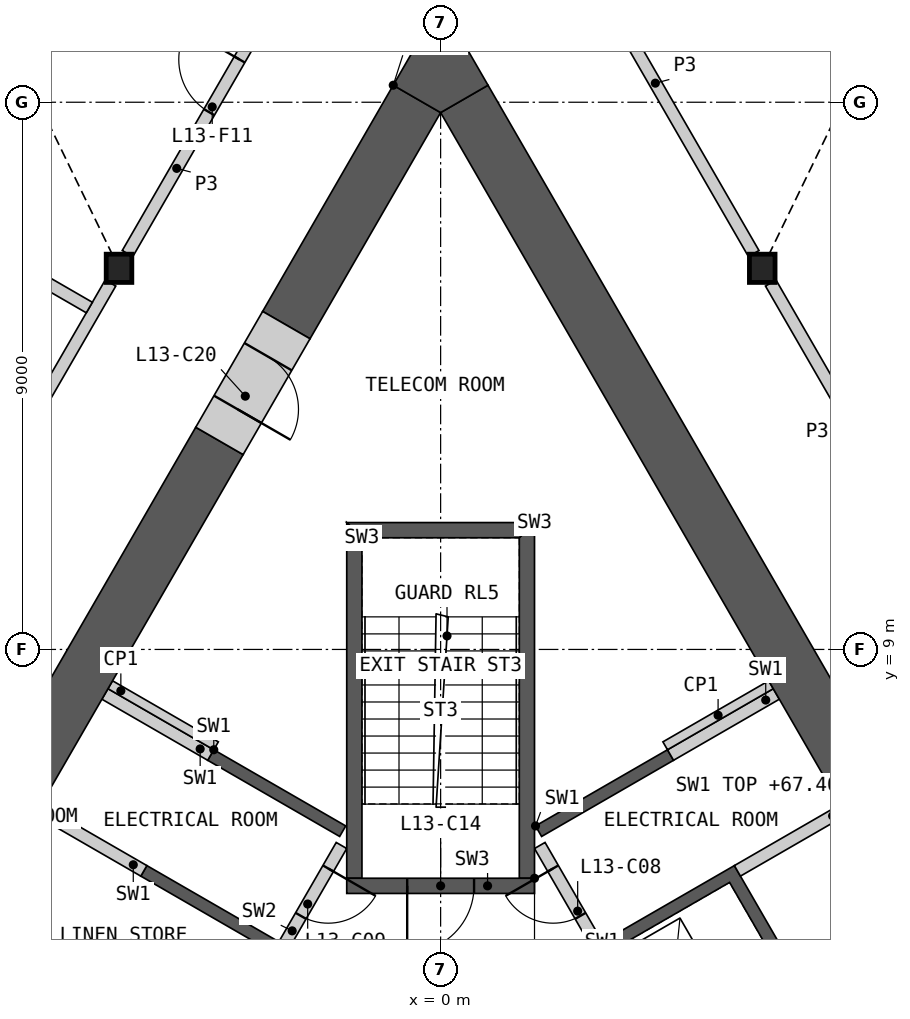
"""IFC4 building model, lengths in metres.
Left out: names, types, materials, properties, quantities, classifications, styles, units other than length and angle.
Written with IfcOpenShell. Run it as: python <this file> out.ifc"""

import sys

from ifc_helpers import new_model, si_unit, direction, frame, frame_2d, origin, origin_2d, place, context, subcontext, project, spatial, polyline, rectangle, i_section, outline, extrude, element, fill, save


model = new_model("IFC4")
c1 = context("Model", 3, precision=1e-05, world=origin(), true_north=direction((0.0, 1.0)))
c2 = subcontext(c1, "Body", "Model", "MODEL_VIEW")
j1 = project(units=[si_unit("LENGTHUNIT", "METRE"), si_unit("PLANEANGLEUNIT", "RADIAN")], contexts=[c1])
p1 = place(None, origin())
s1 = spatial("IfcSite", under=j1, at=p1, CompositionType="ELEMENT")
p2 = place(p1, origin())
s2 = spatial("IfcBuilding", under=s1, at=p2, CompositionType="ELEMENT")
p3 = place(p2, frame((0.0, 0.0, 63.6)))
s3 = spatial("IfcBuildingStorey", under=s2, at=p3, CompositionType="ELEMENT", Elevation=63.6)
for number, where, z_axis, x_axis in (
    (1, (-5.289, 15.269, 0.0), (0.0, 0.0, 1.0), (1.0, 0.0, 0.0)),
    (2, (5.289, 15.269, 0.0), (0.0, 0.0, 1.0), (1.0, 0.0, 0.0)),
):
    element("IfcColumn", number, at=place(p3, frame(where, z_axis=z_axis, x_axis=x_axis)), inside=s3, PredefinedType="COLUMN", context=c2, shape_type="SweptSolid", body=[
        extrude(i_section(OverallWidth=0.421, OverallDepth=0.465, WebThickness=0.045, FlangeThickness=0.072, at=origin_2d()), origin(), (0.0, 0.0, 1.0), 4.2),
    ])
p4 = place(p3, origin())
e3 = element("IfcWall", 3, at=p4, inside=s3, PredefinedType="SHEAR", context=c2, shape_type="SweptSolid", body=[
    extrude(outline(polyline([(1.561, 6.097), (3.731, 7.35), (3.831, 7.177), (1.66, 5.924), (1.561, 6.097)])), origin(), (0.0, 0.0, 1.0), 3.8),
])
p5 = place(p3, origin())
e4 = element("IfcWall", 4, at=p5, inside=s3, PredefinedType="SHEAR", context=c2, shape_type="SweptSolid", body=[
    extrude(outline(polyline([(2.66, 4.192), (4.831, 5.445), (8.231, -0.444), (6.061, -1.697), (5.96, -1.524), (7.952, -0.374), (6.952, 1.358), (4.96, 0.208), (4.861, 0.381), (6.852, 1.531), (5.852, 3.263), (3.861, 2.113), (3.76, 2.287), (5.752, 3.437), (4.752, 5.169), (2.76, 4.019), (2.66, 4.192)])), origin(), (0.0, 0.0, 1.0), 3.8),
])
p6 = place(p3, frame((5.817, -1.476, 0.0), z_axis=(0.0, 0.0, 1.0), x_axis=(-0.500002616675, 0.866023893041, 0.0)))
e5 = element("IfcWall", 5, at=p6, inside=s3, PredefinedType="SOLIDWALL", context=c2, shape_type="SweptSolid", body=[
    extrude(rectangle(XDim=8.373, YDim=0.2, at=frame_2d((4.187, 0.0))), origin(), (0.0, 0.0, 1.0), 3.8),
])
p7 = place(p6, frame((0.337, 0.0, 0.0)))
e6 = element("IfcOpeningElement", 6, at=p7, cuts=e5, PredefinedType="OPENING", context=c2, shape_type="SweptSolid", body=[
    extrude(rectangle(XDim=1.1, YDim=2.1, at=frame_2d((0.55, 1.05))), frame((0.0, 0.11, 0.0), z_axis=(0.0, -1.0, 0.0), x_axis=(1.0, 0.0, 0.0)), (0.0, 0.0, 1.0), 0.22),
])
p8 = place(p6, frame((2.537, 0.0, 0.0)))
e7 = element("IfcOpeningElement", 7, at=p8, cuts=e5, PredefinedType="OPENING", context=c2, shape_type="SweptSolid", body=[
    extrude(rectangle(XDim=1.1, YDim=2.1, at=frame_2d((0.55, 1.05))), frame((0.0, 0.11, 0.0), z_axis=(0.0, -1.0, 0.0), x_axis=(1.0, 0.0, 0.0)), (0.0, 0.0, 1.0), 0.22),
])
p9 = place(p6, frame((4.737, 0.0, 0.0)))
e8 = element("IfcOpeningElement", 8, at=p9, cuts=e5, PredefinedType="OPENING", context=c2, shape_type="SweptSolid", body=[
    extrude(rectangle(XDim=1.1, YDim=2.1, at=frame_2d((0.55, 1.05))), frame((0.0, 0.11, 0.0), z_axis=(0.0, -1.0, 0.0), x_axis=(1.0, 0.0, 0.0)), (0.0, 0.0, 1.0), 0.22),
])
p10 = place(p6, frame((7.037, 0.0, 0.0)))
e9 = element("IfcOpeningElement", 9, at=p10, cuts=e5, PredefinedType="OPENING", context=c2, shape_type="SweptSolid", body=[
    extrude(rectangle(XDim=0.9, YDim=2.1, at=frame_2d((0.45, 1.05))), frame((0.0, 0.11, 0.0), z_axis=(0.0, -1.0, 0.0), x_axis=(1.0, 0.0, 0.0)), (0.0, 0.0, 1.0), 0.22),
])
p11 = place(p3, frame((4.881, 5.358, 0.0), z_axis=(0.0, 0.0, 1.0), x_axis=(0.866035824272, 0.499981950752, 0.0)))
e10 = element("IfcWall", 10, at=p11, inside=s3, PredefinedType="SHEAR", context=c2, shape_type="SweptSolid", body=[
    extrude(rectangle(XDim=2.009, YDim=0.2, at=frame_2d((1.004, 0.0))), origin(), (0.0, 0.0, 1.0), 3.8),
])
p12 = place(p3, frame((3.781, 7.263, 0.0), z_axis=(0.0, 0.0, 1.0), x_axis=(0.865983199114, 0.50007309351, 0.0)))
e11 = element("IfcWall", 11, at=p12, inside=s3, PredefinedType="SHEAR", context=c2, shape_type="SweptSolid", body=[
    extrude(rectangle(XDim=2.009, YDim=0.2, at=frame_2d((1.004, 0.0))), origin(), (0.0, 0.0, 1.0), 3.8),
])
p13 = place(p3, origin())
e12 = element("IfcWall", 12, at=p13, inside=s3, PredefinedType="SHEAR", context=c2, shape_type="SweptSolid", body=[
    extrude(outline(polyline([(-2.76, 4.019), (-4.931, 5.272), (-4.831, 5.445), (-2.66, 4.192), (-2.76, 4.019)])), origin(), (0.0, 0.0, 1.0), 3.8),
])
p14 = place(p3, origin())
e13 = element("IfcWall", 13, at=p14, inside=s3, PredefinedType="SHEAR", context=c2, shape_type="SweptSolid", body=[
    extrude(outline(polyline([(-3.731, 7.35), (-1.561, 6.097), (-1.66, 5.924), (-3.831, 7.177), (-3.731, 7.35)])), origin(), (0.0, 0.0, 1.0), 3.8),
])
p15 = place(p3, frame((-1.631, 5.776, 0.0), z_axis=(0.0, 0.0, 1.0), x_axis=(-0.499992876559, -0.866029516466, 0.0)))
e14 = element("IfcWall", 14, at=p15, inside=s3, PredefinedType="SOLIDWALL", context=c2, shape_type="SweptSolid", body=[
    extrude(rectangle(XDim=6.486, YDim=0.2, at=frame_2d((3.243, 0.0))), origin(), (0.0, 0.0, 1.0), 3.8),
])
p16 = place(p15, frame((0.437, 0.0, 0.0)))
e15 = element("IfcOpeningElement", 15, at=p16, cuts=e14, PredefinedType="OPENING", context=c2, shape_type="SweptSolid", body=[
    extrude(rectangle(XDim=0.9, YDim=2.1, at=frame_2d((0.45, 1.05))), frame((0.0, 0.11, 0.0), z_axis=(0.0, -1.0, 0.0), x_axis=(1.0, 0.0, 0.0)), (0.0, 0.0, 1.0), 0.22),
])
p17 = place(p15, frame((2.637, 0.0, 0.0)))
e16 = element("IfcOpeningElement", 16, at=p17, cuts=e14, PredefinedType="OPENING", context=c2, shape_type="SweptSolid", body=[
    extrude(rectangle(XDim=0.9, YDim=2.1, at=frame_2d((0.45, 1.05))), frame((0.0, 0.11, 0.0), z_axis=(0.0, -1.0, 0.0), x_axis=(1.0, 0.0, 0.0)), (0.0, 0.0, 1.0), 0.22),
])
p18 = place(p3, frame((-3.781, 7.263, 0.0), z_axis=(0.0, 0.0, 1.0), x_axis=(-0.865983199114, 0.50007309351, 0.0)))
e17 = element("IfcWall", 17, at=p18, inside=s3, PredefinedType="SHEAR", context=c2, shape_type="SweptSolid", body=[
    extrude(rectangle(XDim=2.009, YDim=0.2, at=frame_2d((1.004, 0.0))), origin(), (0.0, 0.0, 1.0), 3.8),
])
p19 = place(p3, frame((-4.881, 5.358, 0.0), z_axis=(0.0, 0.0, 1.0), x_axis=(-0.866035824272, 0.499981950752, 0.0)))
e18 = element("IfcWall", 18, at=p19, inside=s3, PredefinedType="SHEAR", context=c2, shape_type="SweptSolid", body=[
    extrude(rectangle(XDim=2.009, YDim=0.2, at=frame_2d((1.004, 0.0))), origin(), (0.0, 0.0, 1.0), 3.8),
])
p20 = place(p3, frame((-5.981, 3.453, 0.0), z_axis=(0.0, 0.0, 1.0), x_axis=(-0.866013584312, 0.500020471368, 0.0)))
e19 = element("IfcWall", 19, at=p20, inside=s3, PredefinedType="SHEAR", context=c2, shape_type="SweptSolid", body=[
    extrude(rectangle(XDim=2.009, YDim=0.2, at=frame_2d((1.005, 0.0))), origin(), (0.0, 0.0, 1.0), 3.8),
])
p21 = place(p3, origin())
e20 = element("IfcWall", 20, at=p21, inside=s3, PredefinedType="SHEAR", context=c2, shape_type="SweptSolid", body=[
    extrude(outline(polyline([(1.544, 5.237), (1.544, 11.087), (1.294, 10.837), (1.294, 5.237), (1.544, 5.237)])), origin(), (0.0, 0.0, 1.0), 3.8),
])
p22 = place(p3, origin())
e21 = element("IfcWall", 21, at=p22, inside=s3, PredefinedType="SHEAR", context=c2, shape_type="SweptSolid", body=[
    extrude(outline(polyline([(1.544, 11.087), (-1.544, 11.087), (-1.294, 10.837), (1.294, 10.837), (1.544, 11.087)])), origin(), (0.0, 0.0, 1.0), 3.8),
])
p23 = place(p3, origin())
e22 = element("IfcWall", 22, at=p23, inside=s3, PredefinedType="SHEAR", context=c2, shape_type="SweptSolid", body=[
    extrude(outline(polyline([(-1.294, 10.837), (-1.544, 11.087), (-1.544, 5.237), (-1.294, 5.237), (-1.294, 10.837)])), origin(), (0.0, 0.0, 1.0), 3.8),
])
p24 = place(p3, frame((1.544, 5.112, 0.0), z_axis=(0.0, 0.0, 1.0), x_axis=(-1.0, 0.0, 0.0)))
e23 = element("IfcWall", 23, at=p24, inside=s3, PredefinedType="SHEAR", context=c2, shape_type="SweptSolid", body=[
    extrude(rectangle(XDim=3.088, YDim=0.25, at=frame_2d((1.544, 0.0))), origin(), (0.0, 0.0, 1.0), 3.8),
])
p25 = place(p24, frame((0.994, 0.0, 0.0)))
e24 = element("IfcOpeningElement", 24, at=p25, cuts=e23, PredefinedType="OPENING", context=c2, shape_type="SweptSolid", body=[
    extrude(rectangle(XDim=1.1, YDim=2.1, at=frame_2d((0.55, 1.05))), frame((0.0, 0.135, 0.0), z_axis=(0.0, -1.0, 0.0), x_axis=(1.0, 0.0, 0.0)), (0.0, 0.0, 1.0), 0.27),
])
for number, where, z_axis, x_axis in (
    (25, (3.693, 7.415, 0.0), (0.0, 0.0, 1.0), (0.866, 0.5, 0.0)),
    (26, (-3.693, 7.415, 0.0), (0.0, 0.0, 1.0), (-0.866, 0.5, 0.0)),
):
    element("IfcWall", number, at=place(p3, frame(where, z_axis=z_axis, x_axis=x_axis)), inside=s3, PredefinedType="PARTITIONING", context=c2, shape_type="SweptSolid", body=[
        extrude(rectangle(XDim=2.009, YDim=0.15, at=frame_2d((1.004, 0.0))), origin(), (0.0, 0.0, 1.0), 3.8),
    ])
p26 = place(p3, frame((8.16, 4.596, 0.0), z_axis=(0.0, 0.0, 1.0), x_axis=(-0.500009830349, 0.866019728156, 0.0)))
e27 = element("IfcWall", 27, at=p26, inside=s3, PredefinedType="SHEAR", context=c2, shape_type="SweptSolid", body=[
    extrude(rectangle(XDim=15.541, YDim=0.9, at=frame_2d((7.771, 0.0))), origin(), (0.0, 0.0, 1.0), 3.8),
])
p27 = place(p3, frame((-3.637, 12.43, 0.0), z_axis=(0.0, 0.0, 1.0), x_axis=(-0.500011513458, -0.866018756384, 0.0)))
e28 = element("IfcWall", 28, at=p27, inside=s3, PredefinedType="SHEAR", context=c2, shape_type="SweptSolid", body=[
    extrude(rectangle(XDim=9.066, YDim=0.9, at=frame_2d((4.533, 0.0))), origin(), (0.0, 0.0, 1.0), 3.8),
])
p28 = place(p3, frame((-0.39, 18.055, 0.0), z_axis=(0.0, 0.0, 1.0), x_axis=(-0.500014347272, -0.866017120224, 0.0)))
e29 = element("IfcWall", 29, at=p28, inside=s3, PredefinedType="SHEAR", context=c2, shape_type="SweptSolid", body=[
    extrude(rectangle(XDim=4.296, YDim=0.9, at=frame_2d((2.148, 0.0))), origin(), (0.0, 0.0, 1.0), 3.8),
])
p29 = place(p3, origin())
e30 = element("IfcWall", 30, at=p29, inside=s3, PredefinedType="SHEAR", context=c2, shape_type="SweptSolid", body=[
    extrude(outline(polyline([(-0.779, 18.28), (0.0, 19.63), (0.779, 18.28), (0.0, 17.83), (-0.779, 18.28)])), origin(), (0.0, 0.0, 1.0), 3.8),
])
p30 = place(p3, frame((-2.538, 14.335, 0.0), z_axis=(0.0, 0.0, 1.0), x_axis=(-0.499994660107, -0.866028486751, 0.0)))
e31 = element("IfcWall", 31, at=p30, inside=s3, PredefinedType="SHEAR", context=c2, shape_type="SweptSolid", body=[
    extrude(rectangle(XDim=2.2, YDim=0.9, at=frame_2d((1.1, 0.0))), origin(), (0.0, 0.0, 1.0), 3.8),
])
p31 = place(p30, frame((0.6, 0.0, 0.0)))
e32 = element("IfcOpeningElement", 32, at=p31, cuts=e31, PredefinedType="OPENING", context=c2, shape_type="SweptSolid", body=[
    extrude(rectangle(XDim=1.0, YDim=2.1, at=frame_2d((0.5, 1.05))), frame((0.0, 0.46, 0.0), z_axis=(0.0, -1.0, 0.0), x_axis=(1.0, 0.0, 0.0)), (0.0, 0.0, 1.0), 0.92),
])
p32 = place(p3, frame((5.429, 15.026, 0.0), z_axis=(0.0, 0.0, 1.0), x_axis=(0.50001002959, -0.86601961312, 0.0)))
e33 = element("IfcWall", 33, at=p32, inside=s3, PredefinedType="PARTITIONING", context=c2, shape_type="SweptSolid", body=[
    extrude(rectangle(XDim=10.019, YDim=0.2, at=frame_2d((5.009, 0.0))), origin(), (0.0, 0.0, 1.0), 3.8),
])
p33 = place(p32, frame((4.059, 0.0, 0.0)))
e34 = element("IfcOpeningElement", 34, at=p33, cuts=e33, PredefinedType="OPENING", context=c2, shape_type="SweptSolid", body=[
    extrude(rectangle(XDim=1.8, YDim=2.1, at=frame_2d((0.9, 1.05))), frame((0.0, 0.11, 0.0), z_axis=(0.0, -1.0, 0.0), x_axis=(1.0, 0.0, 0.0)), (0.0, 0.0, 1.0), 0.22),
])
p34 = place(p3, frame((-10.439, 6.35, 0.0), z_axis=(0.0, 0.0, 1.0), x_axis=(0.50001002959, 0.86601961312, 0.0)))
e35 = element("IfcWall", 35, at=p34, inside=s3, PredefinedType="PARTITIONING", context=c2, shape_type="SweptSolid", body=[
    extrude(rectangle(XDim=10.019, YDim=0.2, at=frame_2d((5.009, 0.0))), origin(), (0.0, 0.0, 1.0), 3.8),
])
p35 = place(p34, frame((4.259, 0.0, 0.0)))
e36 = element("IfcOpeningElement", 36, at=p35, cuts=e35, PredefinedType="OPENING", context=c2, shape_type="SweptSolid", body=[
    extrude(rectangle(XDim=1.0, YDim=2.1, at=frame_2d((0.5, 1.05))), frame((0.0, 0.11, 0.0), z_axis=(0.0, -1.0, 0.0), x_axis=(1.0, 0.0, 0.0)), (0.0, 0.0, 1.0), 0.22),
])
p36 = place(p3, frame((1.913, 21.116, 0.0), z_axis=(0.0, 0.0, 1.0), x_axis=(0.500001069878, -0.866024786089, 0.0)))
e37 = element("IfcWall", 37, at=p36, inside=s3, PredefinedType="PARTITIONING", context=c2, shape_type="SweptSolid", body=[
    extrude(rectangle(XDim=6.473, YDim=0.2, at=frame_2d((3.236, 0.0))), origin(), (0.0, 0.0, 1.0), 3.8),
])
p37 = place(p3, frame((-5.149, 15.511, 0.0), z_axis=(0.0, 0.0, 1.0), x_axis=(0.500001069878, 0.866024786089, 0.0)))
e38 = element("IfcWall", 38, at=p37, inside=s3, PredefinedType="PARTITIONING", context=c2, shape_type="SweptSolid", body=[
    extrude(rectangle(XDim=6.473, YDim=0.2, at=frame_2d((3.236, 0.0))), origin(), (0.0, 0.0, 1.0), 3.8),
])
p38 = place(p37, frame((2.686, 0.0, 0.0)))
e39 = element("IfcOpeningElement", 39, at=p38, cuts=e38, PredefinedType="OPENING", context=c2, shape_type="SweptSolid", body=[
    extrude(rectangle(XDim=1.0, YDim=2.1, at=frame_2d((0.5, 1.05))), frame((0.0, 0.11, 0.0), z_axis=(0.0, -1.0, 0.0), x_axis=(1.0, 0.0, 0.0)), (0.0, 0.0, 1.0), 0.22),
])
p39 = place(p3, frame((-16.981, 21.092, 0.0), z_axis=(0.0, 0.0, 1.0), x_axis=(0.866026884493, -0.499997435328, 0.0)))
e40 = element("IfcWall", 40, at=p39, inside=s3, PredefinedType="PARTITIONING", context=c2, shape_type="SweptSolid", body=[
    extrude(rectangle(XDim=12.937, YDim=0.2, at=frame_2d((6.469, 0.0))), origin(), (0.0, 0.0, 1.0), 2.885),
])
p40 = place(p10, origin())
e41 = element("IfcDoor", 41, at=p40, inside=s3, OperationType="SINGLE_SWING_RIGHT", PredefinedType="DOOR", context=c2, shape_type="SweptSolid", body=[
    extrude(rectangle(XDim=0.9, YDim=2.1, at=frame_2d((0.45, 1.05))), frame((0.0, 0.025, 0.0), z_axis=(0.0, -1.0, 0.0), x_axis=(1.0, 0.0, 0.0)), (0.0, 0.0, 1.0), 0.05),
])
fill(e9, e41)
p41 = place(p16, origin())
e42 = element("IfcDoor", 42, at=p41, inside=s3, OperationType="SINGLE_SWING_LEFT", PredefinedType="DOOR", context=c2, shape_type="SweptSolid", body=[
    extrude(rectangle(XDim=0.9, YDim=2.1, at=frame_2d((0.45, 1.05))), frame((0.0, 0.025, 0.0), z_axis=(0.0, -1.0, 0.0), x_axis=(1.0, 0.0, 0.0)), (0.0, 0.0, 1.0), 0.05),
])
fill(e15, e42)
p42 = place(p25, origin())
e43 = element("IfcDoor", 43, at=p42, inside=s3, OperationType="SINGLE_SWING_RIGHT", PredefinedType="DOOR", context=c2, shape_type="SweptSolid", body=[
    extrude(rectangle(XDim=1.1, YDim=2.1, at=frame_2d((0.55, 1.05))), frame((0.0, 0.025, 0.0), z_axis=(0.0, -1.0, 0.0), x_axis=(1.0, 0.0, 0.0)), (0.0, 0.0, 1.0), 0.05),
])
fill(e24, e43)
p43 = place(p31, origin())
e44 = element("IfcDoor", 44, at=p43, inside=s3, OperationType="SINGLE_SWING_RIGHT", PredefinedType="DOOR", context=c2, shape_type="SweptSolid", body=[
    extrude(rectangle(XDim=1.0, YDim=2.1, at=frame_2d((0.5, 1.05))), frame((0.0, 0.205, 0.0), z_axis=(0.0, -1.0, 0.0), x_axis=(1.0, 0.0, 0.0)), (0.0, 0.0, 1.0), 0.05),
])
fill(e32, e44)
p44 = place(p38, origin())
e45 = element("IfcDoor", 45, at=p44, inside=s3, OperationType="SINGLE_SWING_RIGHT", PredefinedType="DOOR", context=c2, shape_type="SweptSolid", body=[
    extrude(rectangle(XDim=1.0, YDim=2.1, at=frame_2d((0.5, 1.05))), frame((0.0, 0.025, 0.0), z_axis=(0.0, -1.0, 0.0), x_axis=(1.0, 0.0, 0.0)), (0.0, 0.0, 1.0), 0.05),
])
fill(e39, e45)
save(model, sys.argv[1])
